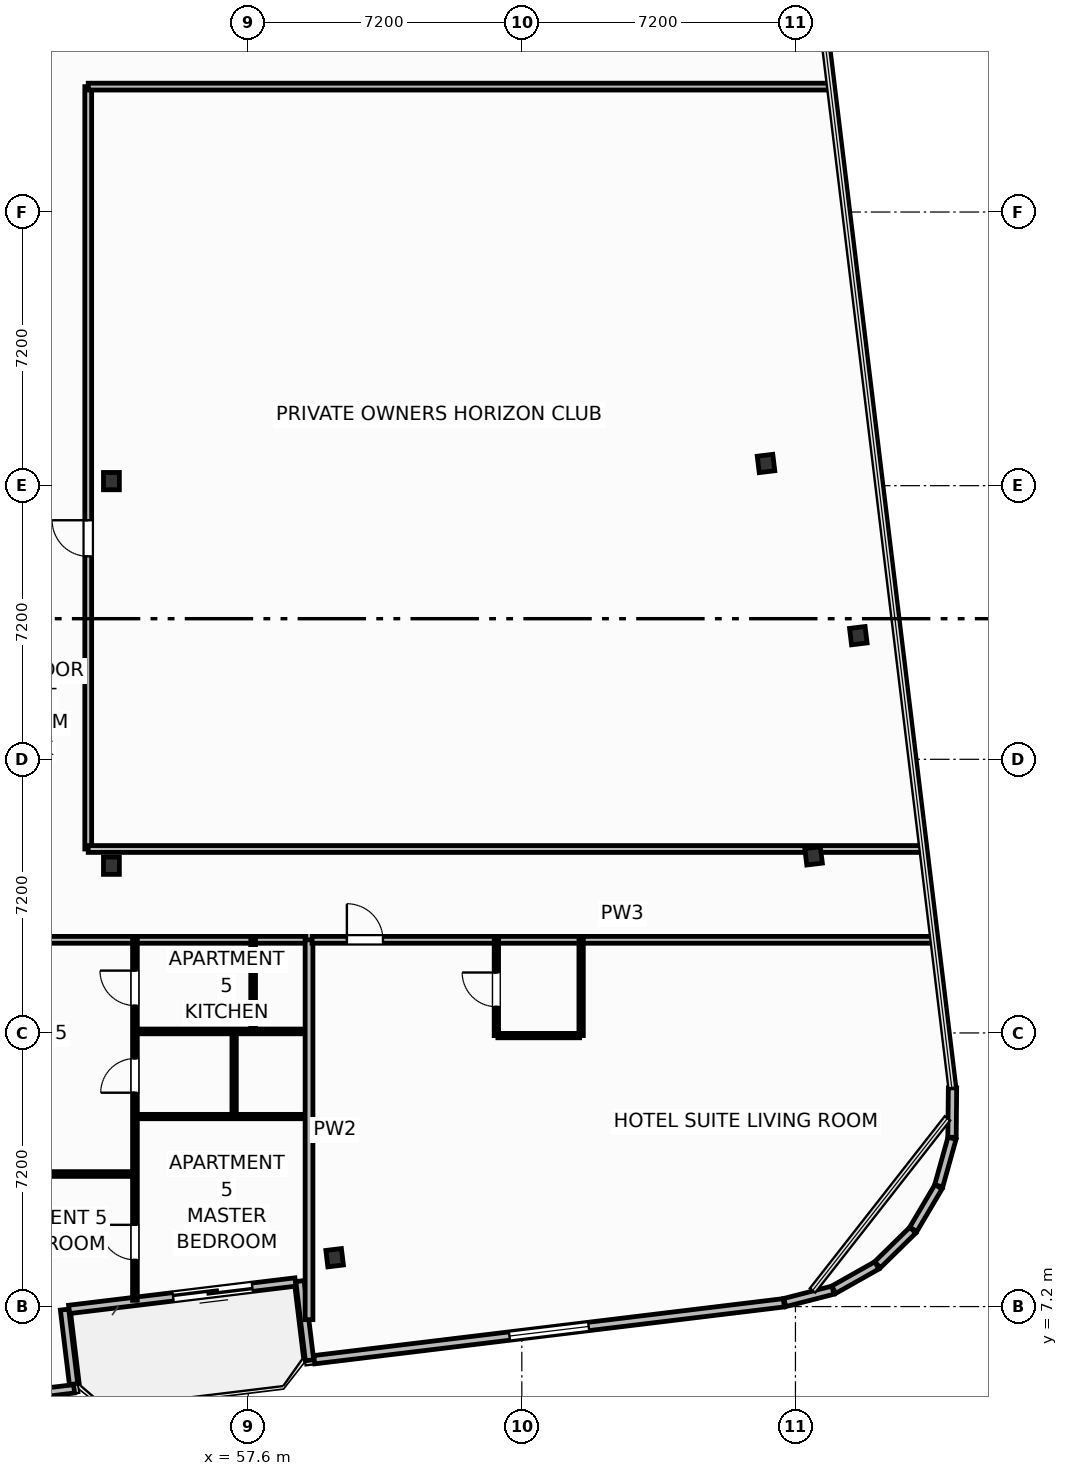
"""IFC4 building model, lengths in metres.
Left out: names, types, materials, properties, quantities, classifications, styles, units other than length and angle.
Written with IfcOpenShell. Run it as: python <this file> out.ifc"""

import sys

from ifc_helpers import new_model, si_unit, direction, frame, frame_2d, origin, origin_2d, place, context, subcontext, project, spatial, rectangle, i_section, extrude, element, fill, save


model = new_model("IFC4")
c1 = context("Model", 3, precision=1e-05, world=origin(), true_north=direction((0.0, 1.0)))
c2 = subcontext(c1, "Body", "Model", "MODEL_VIEW")
j1 = project(units=[si_unit("LENGTHUNIT", "METRE"), si_unit("PLANEANGLEUNIT", "RADIAN")], contexts=[c1])
p1 = place(None, origin())
s1 = spatial("IfcSite", under=j1, at=p1, CompositionType="ELEMENT")
p2 = place(p1, origin())
s2 = spatial("IfcBuilding", under=s1, at=p2, CompositionType="ELEMENT")
p3 = place(p2, frame((0.0, 0.0, 167.2)))
s3 = spatial("IfcBuildingStorey", under=s2, at=p3, CompositionType="ELEMENT", Elevation=167.2)
for number, where, z_axis, x_axis in (
    (1, (54.0, 18.8, 0.0), (0.0, 0.0, 1.0), (1.0, 0.0, 0.0)),
    (2, (54.0, 28.92, 0.0), (0.0, 0.0, 1.0), (1.0, 0.0, 0.0)),
):
    element("IfcColumn", number, at=place(p3, frame(where, z_axis=z_axis, x_axis=x_axis)), inside=s3, PredefinedType="COLUMN", context=c2, shape_type="SweptSolid", body=[
        extrude(i_section(OverallWidth=0.418, OverallDepth=0.455, WebThickness=0.042, FlangeThickness=0.068, FilletRadius=0.025, at=origin_2d()), origin(), (0.0, 0.0, 1.0), 3.7),
    ])
for number, where, z_axis, x_axis in (
    (3, (59.874, 8.486, 0.0), (0.0, 0.0, 1.0), (0.993, 0.12, 0.0)),
    (4, (72.477, 19.059, 0.0), (0.0, 0.0, 1.0), (0.993, 0.12, 0.0)),
    (5, (73.654, 24.853, 0.0), (0.0, 0.0, 1.0), (0.993, 0.12, 0.0)),
    (6, (71.225, 29.384, 0.0), (0.0, 0.0, 1.0), (0.993, 0.12, 0.0)),
):
    element("IfcColumn", number, at=place(p3, frame(where, z_axis=z_axis, x_axis=x_axis)), inside=s3, PredefinedType="COLUMN", context=c2, shape_type="SweptSolid", body=[
        extrude(i_section(OverallWidth=0.412, OverallDepth=0.435, WebThickness=0.036, FlangeThickness=0.057, FilletRadius=0.025, at=origin_2d()), origin(), (0.0, 0.0, 1.0), 3.7),
    ])
p4 = place(p3, frame((58.843, 7.847, 0.0), z_axis=(0.0, 0.0, 1.0), x_axis=(-0.992729951822, -0.120362962556, 0.0)))
e7 = element("IfcWall", 7, at=p4, inside=s3, PredefinedType="SOLIDWALL", context=c2, shape_type="SweptSolid", body=[
    extrude(rectangle(XDim=6.0, YDim=0.22, at=frame_2d((3.0, 0.0))), origin(), (0.0, 0.0, 1.0), 2.73),
])
p5 = place(p4, frame((1.144, 0.0, 0.0)))
e8 = element("IfcOpeningElement", 8, at=p5, cuts=e7, PredefinedType="OPENING", context=c2, shape_type="SweptSolid", body=[
    extrude(rectangle(XDim=2.1, YDim=2.3, at=frame_2d((1.05, 1.15))), frame((0.0, 0.12, 0.0), z_axis=(0.0, -1.0, 0.0), x_axis=(1.0, 0.0, 0.0)), (0.0, 0.0, 1.0), 0.24),
])
p6 = place(p3, frame((45.042, 4.069, 0.0), z_axis=(0.0, 0.0, 1.0), x_axis=(0.992731032022, 0.120354052946, 0.0)))
e9 = element("IfcWall", 9, at=p6, inside=s3, PredefinedType="SOLIDWALL", context=c2, shape_type="SweptSolid", body=[
    extrude(rectangle(XDim=8.035, YDim=0.22, at=frame_2d((4.018, 0.0))), origin(), (0.0, 0.0, 1.0), 2.73),
])
p7 = place(p6, frame((4.273, 0.0, 0.8)))
e10 = element("IfcOpeningElement", 10, at=p7, cuts=e9, PredefinedType="OPENING", context=c2, shape_type="SweptSolid", body=[
    extrude(rectangle(XDim=2.1, YDim=1.75, at=frame_2d((1.05, 0.875))), frame((0.0, 0.12, 0.0), z_axis=(0.0, -1.0, 0.0), x_axis=(1.0, 0.0, 0.0)), (0.0, 0.0, 1.0), 0.24),
])
p8 = place(p3, frame((53.004, 5.16, 0.0), z_axis=(0.0, 0.0, 1.0), x_axis=(-0.120397815541, 0.992725725472, 0.0)))
e11 = element("IfcWall", 11, at=p8, inside=s3, PredefinedType="SOLIDWALL", context=c2, shape_type="SweptSolid", body=[
    extrude(rectangle(XDim=1.975, YDim=0.22, at=frame_2d((0.988, 0.0))), origin(), (0.0, 0.0, 1.0), 2.73),
])
p9 = place(p3, frame((58.961, 7.872, 0.0), z_axis=(0.0, 0.0, 1.0), x_axis=(0.120327895535, -0.992734202874, 0.0)))
e12 = element("IfcWall", 12, at=p9, inside=s3, PredefinedType="SOLIDWALL", context=c2, shape_type="SweptSolid", body=[
    extrude(rectangle(XDim=2.1, YDim=0.22, at=frame_2d((1.05, 0.0))), origin(), (0.0, 0.0, 1.0), 2.73),
])
p10 = place(p3, frame((59.338, 5.802, 0.0), z_axis=(0.0, 0.0, 1.0), x_axis=(0.992731225757, 0.120352454927, 0.0)))
e13 = element("IfcWall", 13, at=p10, inside=s3, PredefinedType="SOLIDWALL", context=c2, shape_type="SweptSolid", body=[
    extrude(rectangle(XDim=12.447, YDim=0.22, at=frame_2d((6.224, 0.0))), origin(), (0.0, 0.0, 1.0), 2.73),
])
p11 = place(p10, frame((5.174, 0.0, 0.8)))
e14 = element("IfcOpeningElement", 14, at=p11, cuts=e13, PredefinedType="OPENING", context=c2, shape_type="SweptSolid", body=[
    extrude(rectangle(XDim=2.1, YDim=1.75, at=frame_2d((1.05, 0.875))), frame((0.0, 0.12, 0.0), z_axis=(0.0, -1.0, 0.0), x_axis=(1.0, 0.0, 0.0)), (0.0, 0.0, 1.0), 0.24),
])
p12 = place(p3, frame((71.719, 7.306, 0.0), z_axis=(0.0, 0.0, 1.0), x_axis=(0.968541764193, 0.248851061909, 0.0)))
e15 = element("IfcWall", 15, at=p12, inside=s3, PredefinedType="SOLIDWALL", context=c2, shape_type="SweptSolid", body=[
    extrude(rectangle(XDim=1.309, YDim=0.22, at=frame_2d((0.654, 0.0))), origin(), (0.0, 0.0, 1.0), 2.73),
])
for number, where, z_axis, x_axis in (
    (16, (73.008, 7.644, 0.0), (0.0, 0.0, 1.0), (0.871, 0.491, 0.0)),
    (17, (74.159, 8.3, 0.0), (0.0, 0.0, 1.0), (0.714, 0.7, 0.0)),
    (18, (75.101, 9.232, 0.0), (0.0, 0.0, 1.0), (0.509, 0.861, 0.0)),
    (19, (75.77, 10.376, 0.0), (0.0, 0.0, 1.0), (0.269, 0.963, 0.0)),
):
    element("IfcWall", number, at=place(p3, frame(where, z_axis=z_axis, x_axis=x_axis)), inside=s3, PredefinedType="SOLIDWALL", context=c2, shape_type="SweptSolid", body=[
        extrude(rectangle(XDim=1.301, YDim=0.22, at=frame_2d((0.65, 0.0))), origin(), (0.0, 0.0, 1.0), 2.73),
    ])
p13 = place(p3, frame((76.12, 11.654, 0.0), z_axis=(0.0, 0.0, 1.0), x_axis=(0.01032033607, 0.999946743914, 0.0)))
e20 = element("IfcWall", 20, at=p13, inside=s3, PredefinedType="SOLIDWALL", context=c2, shape_type="SweptSolid", body=[
    extrude(rectangle(XDim=1.301, YDim=0.22, at=frame_2d((0.65, 0.0))), origin(), (0.0, 0.0, 1.0), 2.73),
])
p14 = place(p3, frame((48.48, 10.688, 0.0), z_axis=(0.0, 0.0, 1.0), x_axis=(1.0, 0.0, 0.0)))
e21 = element("IfcWall", 21, at=p14, inside=s3, PredefinedType="PARTITIONING", context=c2, shape_type="SweptSolid", body=[
    extrude(rectangle(XDim=6.069, YDim=0.125, at=frame_2d((3.035, 0.0))), origin(), (0.0, 0.0, 1.0), 3.45),
])
p15 = place(p14, frame((2.731, 0.0, 0.0)))
e22 = element("IfcOpeningElement", 22, at=p15, cuts=e21, PredefinedType="OPENING", context=c2, shape_type="SweptSolid", body=[
    extrude(rectangle(XDim=0.92, YDim=2.05, at=frame_2d((0.46, 1.025))), frame((0.0, 0.073, 0.0), z_axis=(0.0, -1.0, 0.0), x_axis=(1.0, 0.0, 0.0)), (0.0, 0.0, 1.0), 0.145),
])
p16 = place(p3, frame((48.48, 16.85, 0.0), z_axis=(0.0, 0.0, 1.0), x_axis=(1.0, 0.0, 0.0)))
e23 = element("IfcWall", 23, at=p16, inside=s3, PredefinedType="PARTITIONING", context=c2, shape_type="SweptSolid", body=[
    extrude(rectangle(XDim=10.64, YDim=0.18, at=frame_2d((5.32, 0.0))), origin(), (0.0, 0.0, 1.0), 3.45),
])
p17 = place(p16, frame((2.535, 0.0, 0.0)))
e24 = element("IfcOpeningElement", 24, at=p17, cuts=e23, PredefinedType="OPENING", context=c2, shape_type="SweptSolid", body=[
    extrude(rectangle(XDim=1.0, YDim=2.2, at=frame_2d((0.5, 1.1))), frame((0.0, 0.1, 0.0), z_axis=(0.0, -1.0, 0.0), x_axis=(1.0, 0.0, 0.0)), (0.0, 0.0, 1.0), 0.2),
])
p18 = place(p3, frame((54.619, 7.365, 0.0), z_axis=(0.0, 0.0, 1.0), x_axis=(0.0, 1.0, 0.0)))
e25 = element("IfcWall", 25, at=p18, inside=s3, PredefinedType="PARTITIONING", context=c2, shape_type="SweptSolid", body=[
    extrude(rectangle(XDim=9.485, YDim=0.125, at=frame_2d((4.742, 0.0))), origin(), (0.0, 0.0, 1.0), 3.45),
])
p19 = place(p18, frame((1.065, 0.0, 0.0)))
e26 = element("IfcOpeningElement", 26, at=p19, cuts=e25, PredefinedType="OPENING", context=c2, shape_type="SweptSolid", body=[
    extrude(rectangle(XDim=0.92, YDim=2.05, at=frame_2d((0.46, 1.025))), frame((0.0, 0.073, 0.0), z_axis=(0.0, -1.0, 0.0), x_axis=(1.0, 0.0, 0.0)), (0.0, 0.0, 1.0), 0.145),
])
p20 = place(p18, frame((5.462, 0.0, 0.0)))
e27 = element("IfcOpeningElement", 27, at=p20, cuts=e25, PredefinedType="OPENING", context=c2, shape_type="SweptSolid", body=[
    extrude(rectangle(XDim=0.9, YDim=2.05, at=frame_2d((0.45, 1.025))), frame((0.0, 0.073, 0.0), z_axis=(0.0, -1.0, 0.0), x_axis=(1.0, 0.0, 0.0)), (0.0, 0.0, 1.0), 0.145),
])
p21 = place(p18, frame((7.755, 0.0, 0.0)))
e28 = element("IfcOpeningElement", 28, at=p21, cuts=e25, PredefinedType="OPENING", context=c2, shape_type="SweptSolid", body=[
    extrude(rectangle(XDim=0.92, YDim=2.05, at=frame_2d((0.46, 1.025))), frame((0.0, 0.073, 0.0), z_axis=(0.0, -1.0, 0.0), x_axis=(1.0, 0.0, 0.0)), (0.0, 0.0, 1.0), 0.145),
])
p22 = place(p3, frame((54.689, 14.44, 0.0), z_axis=(0.0, 0.0, 1.0), x_axis=(1.0, 0.0, 0.0)))
e29 = element("IfcWall", 29, at=p22, inside=s3, PredefinedType="PARTITIONING", context=c2, shape_type="SweptSolid", body=[
    extrude(rectangle(XDim=4.431, YDim=0.125, at=frame_2d((2.215, 0.0))), origin(), (0.0, 0.0, 1.0), 3.45),
])
p23 = place(p3, frame((54.689, 12.2, 0.0), z_axis=(0.0, 0.0, 1.0), x_axis=(1.0, 0.0, 0.0)))
e30 = element("IfcWall", 30, at=p23, inside=s3, PredefinedType="PARTITIONING", context=c2, shape_type="SweptSolid", body=[
    extrude(rectangle(XDim=4.431, YDim=0.115, at=frame_2d((2.215, 0.0))), origin(), (0.0, 0.0, 1.0), 3.45),
])
p24 = place(p3, frame((57.729, 14.44, 0.0), z_axis=(0.0, 0.0, 1.0), x_axis=(0.0, 1.0, 0.0)))
e31 = element("IfcWall", 31, at=p24, inside=s3, PredefinedType="PARTITIONING", context=c2, shape_type="SweptSolid", body=[
    extrude(rectangle(XDim=2.41, YDim=0.125, at=frame_2d((1.205, 0.0))), origin(), (0.0, 0.0, 1.0), 3.45),
])
p25 = place(p3, frame((57.229, 12.2, 0.0), z_axis=(0.0, 0.0, 1.0), x_axis=(0.0, 1.0, 0.0)))
e32 = element("IfcWall", 32, at=p25, inside=s3, PredefinedType="PARTITIONING", context=c2, shape_type="SweptSolid", body=[
    extrude(rectangle(XDim=2.24, YDim=0.115, at=frame_2d((1.12, 0.0))), origin(), (0.0, 0.0, 1.0), 3.45),
])
p26 = place(p3, frame((59.2, 6.856, 0.0), z_axis=(0.0, 0.0, 1.0), x_axis=(0.0, 1.0, 0.0)))
e33 = element("IfcWall", 33, at=p26, inside=s3, PredefinedType="PARTITIONING", context=c2, shape_type="SweptSolid", body=[
    extrude(rectangle(XDim=9.994, YDim=0.205, at=frame_2d((4.997, 0.0))), origin(), (0.0, 0.0, 1.0), 3.45),
])
p27 = place(p3, frame((59.28, 16.85, 0.0), z_axis=(0.0, 0.0, 1.0), x_axis=(1.0, 0.0, 0.0)))
e34 = element("IfcWall", 34, at=p27, inside=s3, PredefinedType="PARTITIONING", context=c2, shape_type="SweptSolid", body=[
    extrude(rectangle(XDim=16.322, YDim=0.18, at=frame_2d((8.161, 0.0))), origin(), (0.0, 0.0, 1.0), 3.45),
])
p28 = place(p27, frame((0.916, 0.0, 0.0)))
e35 = element("IfcOpeningElement", 35, at=p28, cuts=e34, PredefinedType="OPENING", context=c2, shape_type="SweptSolid", body=[
    extrude(rectangle(XDim=0.95, YDim=2.15, at=frame_2d((0.475, 1.075))), frame((0.0, 0.1, 0.0), z_axis=(0.0, -1.0, 0.0), x_axis=(1.0, 0.0, 0.0)), (0.0, 0.0, 1.0), 0.2),
])
p29 = place(p3, frame((64.17, 14.33, 0.0), z_axis=(0.0, 0.0, 1.0), x_axis=(1.0, 0.0, 0.0)))
e36 = element("IfcWall", 36, at=p29, inside=s3, PredefinedType="PARTITIONING", context=c2, shape_type="SweptSolid", body=[
    extrude(rectangle(XDim=2.15, YDim=0.115, at=frame_2d((1.075, 0.0))), origin(), (0.0, 0.0, 1.0), 3.45),
])
p30 = place(p3, frame((64.13, 14.33, 0.0), z_axis=(0.0, 0.0, 1.0), x_axis=(0.0, 1.0, 0.0)))
e37 = element("IfcWall", 37, at=p30, inside=s3, PredefinedType="PARTITIONING", context=c2, shape_type="SweptSolid", body=[
    extrude(rectangle(XDim=2.52, YDim=0.115, at=frame_2d((1.26, 0.0))), origin(), (0.0, 0.0, 1.0), 3.45),
])
p31 = place(p30, frame((0.76, 0.0, 0.0)))
e38 = element("IfcOpeningElement", 38, at=p31, cuts=e37, PredefinedType="OPENING", context=c2, shape_type="SweptSolid", body=[
    extrude(rectangle(XDim=0.9, YDim=2.05, at=frame_2d((0.45, 1.025))), frame((0.0, 0.067, 0.0), z_axis=(0.0, -1.0, 0.0), x_axis=(1.0, 0.0, 0.0)), (0.0, 0.0, 1.0), 0.135),
])
p32 = place(p3, frame((66.36, 14.33, 0.0), z_axis=(0.0, 0.0, 1.0), x_axis=(0.0, 1.0, 0.0)))
e39 = element("IfcWall", 39, at=p32, inside=s3, PredefinedType="PARTITIONING", context=c2, shape_type="SweptSolid", body=[
    extrude(rectangle(XDim=2.52, YDim=0.115, at=frame_2d((1.26, 0.0))), origin(), (0.0, 0.0, 1.0), 3.45),
])
p33 = place(p3, frame((53.39, 19.24, 0.0), z_axis=(0.0, 0.0, 1.0), x_axis=(0.0, 1.0, 0.0)))
e40 = element("IfcWall", 40, at=p33, inside=s3, PredefinedType="PARTITIONING", context=c2, shape_type="SweptSolid", body=[
    extrude(rectangle(XDim=20.06, YDim=0.18, at=frame_2d((10.03, 0.0))), origin(), (0.0, 0.0, 1.0), 3.45),
])
p34 = place(p33, frame((7.7, 0.0, 0.0)))
e41 = element("IfcOpeningElement", 41, at=p34, cuts=e40, PredefinedType="OPENING", context=c2, shape_type="SweptSolid", body=[
    extrude(rectangle(XDim=0.95, YDim=2.05, at=frame_2d((0.475, 1.025))), frame((0.0, 0.1, 0.0), z_axis=(0.0, -1.0, 0.0), x_axis=(1.0, 0.0, 0.0)), (0.0, 0.0, 1.0), 0.2),
])
p35 = place(p3, frame((53.39, 19.24, 0.0), z_axis=(0.0, 0.0, 1.0), x_axis=(1.0, 0.0, 0.0)))
e42 = element("IfcWall", 42, at=p35, inside=s3, PredefinedType="PARTITIONING", context=c2, shape_type="SweptSolid", body=[
    extrude(rectangle(XDim=21.922, YDim=0.18, at=frame_2d((10.961, 0.0))), origin(), (0.0, 0.0, 1.0), 2.662),
])
p36 = place(p3, frame((53.39, 39.3, 0.0), z_axis=(0.0, 0.0, 1.0), x_axis=(1.0, 0.0, 0.0)))
e43 = element("IfcWall", 43, at=p36, inside=s3, PredefinedType="PARTITIONING", context=c2, shape_type="SweptSolid", body=[
    extrude(rectangle(XDim=19.49, YDim=0.18, at=frame_2d((9.745, 0.0))), origin(), (0.0, 0.0, 1.0), 3.45),
])
p37 = place(p5, origin())
e44 = element("IfcDoor", 44, at=p37, inside=s3, OperationType="SLIDING_TO_LEFT", PredefinedType="DOOR", context=c2, shape_type="SweptSolid", body=[
    extrude(rectangle(XDim=2.1, YDim=2.3, at=frame_2d((1.05, 1.15))), frame((0.0, 0.025, 0.0), z_axis=(0.0, -1.0, 0.0), x_axis=(1.0, 0.0, 0.0)), (0.0, 0.0, 1.0), 0.05),
])
fill(e8, e44)
p38 = place(p11, origin())
e45 = element("IfcWindow", 45, at=p38, inside=s3, PartitioningType="SINGLE_PANEL", PredefinedType="WINDOW", context=c2, shape_type="SweptSolid", body=[
    extrude(rectangle(XDim=2.1, YDim=1.75, at=frame_2d((1.05, 0.875))), frame((0.0, 0.03, 0.0), z_axis=(0.0, -1.0, 0.0), x_axis=(1.0, 0.0, 0.0)), (0.0, 0.0, 1.0), 0.06),
])
fill(e14, e45)
p39 = place(p19, origin())
e46 = element("IfcDoor", 46, at=p39, inside=s3, OperationType="SINGLE_SWING_RIGHT", PredefinedType="DOOR", context=c2, shape_type="SweptSolid", body=[
    extrude(rectangle(XDim=0.92, YDim=2.05, at=frame_2d((0.46, 1.025))), frame((0.0, 0.025, 0.0), z_axis=(0.0, -1.0, 0.0), x_axis=(1.0, 0.0, 0.0)), (0.0, 0.0, 1.0), 0.05),
])
fill(e26, e46)
p40 = place(p20, origin())
e47 = element("IfcDoor", 47, at=p40, inside=s3, OperationType="SINGLE_SWING_LEFT", PredefinedType="DOOR", context=c2, shape_type="SweptSolid", body=[
    extrude(rectangle(XDim=0.9, YDim=2.05, at=frame_2d((0.45, 1.025))), frame((0.0, 0.025, 0.0), z_axis=(0.0, -1.0, 0.0), x_axis=(1.0, 0.0, 0.0)), (0.0, 0.0, 1.0), 0.05),
])
fill(e27, e47)
p41 = place(p21, origin())
e48 = element("IfcDoor", 48, at=p41, inside=s3, OperationType="SINGLE_SWING_RIGHT", PredefinedType="DOOR", context=c2, shape_type="SweptSolid", body=[
    extrude(rectangle(XDim=0.92, YDim=2.05, at=frame_2d((0.46, 1.025))), frame((0.0, 0.025, 0.0), z_axis=(0.0, -1.0, 0.0), x_axis=(1.0, 0.0, 0.0)), (0.0, 0.0, 1.0), 0.05),
])
fill(e28, e48)
p42 = place(p28, origin())
e49 = element("IfcDoor", 49, at=p42, inside=s3, OperationType="SINGLE_SWING_LEFT", PredefinedType="DOOR", context=c2, shape_type="SweptSolid", body=[
    extrude(rectangle(XDim=0.95, YDim=2.15, at=frame_2d((0.475, 1.075))), frame((0.0, 0.025, 0.0), z_axis=(0.0, -1.0, 0.0), x_axis=(1.0, 0.0, 0.0)), (0.0, 0.0, 1.0), 0.05),
])
fill(e35, e49)
p43 = place(p31, origin())
e50 = element("IfcDoor", 50, at=p43, inside=s3, OperationType="SINGLE_SWING_RIGHT", PredefinedType="DOOR", context=c2, shape_type="SweptSolid", body=[
    extrude(rectangle(XDim=0.9, YDim=2.05, at=frame_2d((0.45, 1.025))), frame((0.0, 0.025, 0.0), z_axis=(0.0, -1.0, 0.0), x_axis=(1.0, 0.0, 0.0)), (0.0, 0.0, 1.0), 0.05),
])
fill(e38, e50)
p44 = place(p34, origin())
e51 = element("IfcDoor", 51, at=p44, inside=s3, OperationType="SINGLE_SWING_RIGHT", PredefinedType="DOOR", context=c2, shape_type="SweptSolid", body=[
    extrude(rectangle(XDim=0.95, YDim=2.05, at=frame_2d((0.475, 1.025))), frame((0.0, 0.025, 0.0), z_axis=(0.0, -1.0, 0.0), x_axis=(1.0, 0.0, 0.0)), (0.0, 0.0, 1.0), 0.05),
])
fill(e41, e51)
save(model, sys.argv[1])
